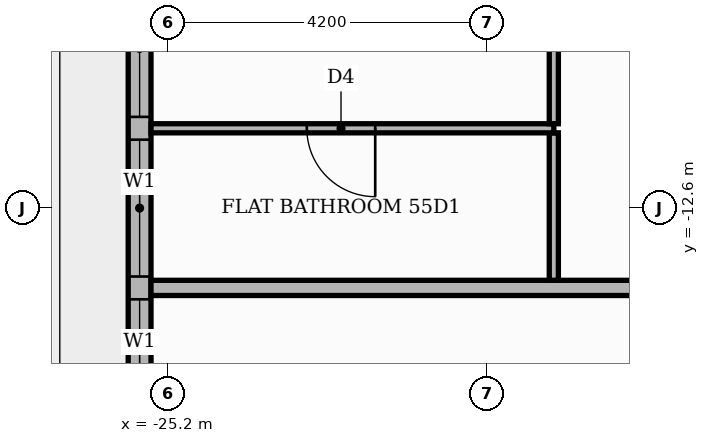
"""IFC4 building model, lengths in metres.
Left out: names, types, materials, properties, quantities, classifications, styles, units other than length and angle.
Written with IfcOpenShell. Run it as: python <this file> out.ifc"""

import sys

from ifc_helpers import new_model, si_unit, direction, frame, frame_2d, origin, place, context, subcontext, project, spatial, rectangle, extrude, element, fill, save


model = new_model("IFC4")
c1 = context("Model", 3, precision=1e-05, world=origin(), true_north=direction((0.0, 1.0)))
c2 = subcontext(c1, "Body", "Model", "MODEL_VIEW")
j1 = project(units=[si_unit("LENGTHUNIT", "METRE"), si_unit("PLANEANGLEUNIT", "RADIAN")], contexts=[c1])
p1 = place(None, origin())
s1 = spatial("IfcSite", under=j1, at=p1, CompositionType="ELEMENT")
p2 = place(p1, origin())
s2 = spatial("IfcBuilding", under=s1, at=p2, CompositionType="ELEMENT")
p3 = place(p2, frame((0.0, 0.0, 231.3)))
s3 = spatial("IfcBuildingStorey", under=s2, at=p3, CompositionType="ELEMENT", Elevation=231.3)
p4 = place(p3, frame((-25.57, -9.0, 0.0), z_axis=(0.0, 0.0, 1.0), x_axis=(0.0, -1.0, 0.0)))
e1 = element("IfcWall", 1, at=p4, inside=s3, PredefinedType="STANDARD", context=c2, shape_type="SweptSolid", body=[
    extrude(rectangle(XDim=7.2, YDim=0.3, at=frame_2d((3.6, 0.0))), origin(), (0.0, 0.0, 1.0), 3.4),
])
p5 = place(p4, frame((0.6, 0.0, 0.9)))
e2 = element("IfcOpeningElement", 2, at=p5, cuts=e1, PredefinedType="OPENING", context=c2, shape_type="SweptSolid", body=[
    extrude(rectangle(XDim=1.8, YDim=2.1, at=frame_2d((0.9, 1.05))), frame((0.0, 0.16, 0.0), z_axis=(0.0, -1.0, 0.0), x_axis=(1.0, 0.0, 0.0)), (0.0, 0.0, 1.0), 0.32),
])
p6 = place(p4, frame((2.7, 0.0, 0.9)))
e3 = element("IfcOpeningElement", 3, at=p6, cuts=e1, PredefinedType="OPENING", context=c2, shape_type="SweptSolid", body=[
    extrude(rectangle(XDim=1.8, YDim=2.1, at=frame_2d((0.9, 1.05))), frame((0.0, 0.16, 0.0), z_axis=(0.0, -1.0, 0.0), x_axis=(1.0, 0.0, 0.0)), (0.0, 0.0, 1.0), 0.32),
])
p7 = place(p4, frame((4.8, 0.0, 0.9)))
e4 = element("IfcOpeningElement", 4, at=p7, cuts=e1, PredefinedType="OPENING", context=c2, shape_type="SweptSolid", body=[
    extrude(rectangle(XDim=1.8, YDim=2.1, at=frame_2d((0.9, 1.05))), frame((0.0, 0.16, 0.0), z_axis=(0.0, -1.0, 0.0), x_axis=(1.0, 0.0, 0.0)), (0.0, 0.0, 1.0), 0.32),
])
p8 = place(p3, frame((-25.42, -13.65, 0.0), z_axis=(0.0, 0.0, 1.0), x_axis=(1.0, 0.0, 0.0)))
e5 = element("IfcWall", 5, at=p8, inside=s3, PredefinedType="PARTITIONING", context=c2, shape_type="SweptSolid", body=[
    extrude(rectangle(XDim=39.07, YDim=0.2, at=frame_2d((19.535, 0.0))), origin(), (0.0, 0.0, 1.0), 3.4),
])
p9 = place(p8, frame((13.32, 0.0, 0.0)))
e6 = element("IfcOpeningElement", 6, at=p9, cuts=e5, PredefinedType="OPENING", context=c2, shape_type="SweptSolid", body=[
    extrude(rectangle(XDim=1.1, YDim=2.4, at=frame_2d((0.55, 1.2))), frame((0.0, 0.11, 0.0), z_axis=(0.0, -1.0, 0.0), x_axis=(1.0, 0.0, 0.0)), (0.0, 0.0, 1.0), 0.22),
])
p10 = place(p8, frame((21.72, 0.0, 0.0)))
e7 = element("IfcOpeningElement", 7, at=p10, cuts=e5, PredefinedType="OPENING", context=c2, shape_type="SweptSolid", body=[
    extrude(rectangle(XDim=1.1, YDim=2.4, at=frame_2d((0.55, 1.2))), frame((0.0, 0.11, 0.0), z_axis=(0.0, -1.0, 0.0), x_axis=(1.0, 0.0, 0.0)), (0.0, 0.0, 1.0), 0.22),
])
p11 = place(p3, frame((-20.12, -13.55, 0.0), z_axis=(0.0, 0.0, 1.0), x_axis=(0.0, 1.0, 0.0)))
e8 = element("IfcWall", 8, at=p11, inside=s3, PredefinedType="PARTITIONING", context=c2, shape_type="SweptSolid", body=[
    extrude(rectangle(XDim=1.94, YDim=0.12, at=frame_2d((0.97, 0.0))), origin(), (0.0, 0.0, 1.0), 3.4),
])
p12 = place(p3, frame((-25.42, -11.55, 0.0), z_axis=(0.0, 0.0, 1.0), x_axis=(1.0, 0.0, 0.0)))
e9 = element("IfcWall", 9, at=p12, inside=s3, PredefinedType="PARTITIONING", context=c2, shape_type="SweptSolid", body=[
    extrude(rectangle(XDim=5.3, YDim=0.12, at=frame_2d((2.65, 0.0))), origin(), (0.0, 0.0, 1.0), 3.4),
])
p13 = place(p12, frame((2.05, 0.0, 0.0)))
e10 = element("IfcOpeningElement", 10, at=p13, cuts=e9, PredefinedType="OPENING", context=c2, shape_type="SweptSolid", body=[
    extrude(rectangle(XDim=0.9, YDim=2.1, at=frame_2d((0.45, 1.05))), frame((0.0, 0.07, 0.0), z_axis=(0.0, -1.0, 0.0), x_axis=(1.0, 0.0, 0.0)), (0.0, 0.0, 1.0), 0.14),
])
p14 = place(p3, frame((-20.12, -11.49, 0.0), z_axis=(0.0, 0.0, 1.0), x_axis=(0.0, 1.0, 0.0)))
e11 = element("IfcWall", 11, at=p14, inside=s3, PredefinedType="PARTITIONING", context=c2, shape_type="SweptSolid", body=[
    extrude(rectangle(XDim=4.08, YDim=0.12, at=frame_2d((2.04, 0.0))), origin(), (0.0, 0.0, 1.0), 3.4),
])
p15 = place(p14, frame((1.59, 0.0, 0.0)))
e12 = element("IfcOpeningElement", 12, at=p15, cuts=e11, PredefinedType="OPENING", context=c2, shape_type="SweptSolid", body=[
    extrude(rectangle(XDim=0.9, YDim=2.1, at=frame_2d((0.45, 1.05))), frame((0.0, 0.07, 0.0), z_axis=(0.0, -1.0, 0.0), x_axis=(1.0, 0.0, 0.0)), (0.0, 0.0, 1.0), 0.14),
])
p16 = place(p5, origin())
e13 = element("IfcWindow", 13, at=p16, inside=s3, PartitioningType="SINGLE_PANEL", PredefinedType="WINDOW", context=c2, shape_type="SweptSolid", body=[
    extrude(rectangle(XDim=1.8, YDim=2.1, at=frame_2d((0.9, 1.05))), frame((0.0, 0.03, 0.0), z_axis=(0.0, -1.0, 0.0), x_axis=(1.0, 0.0, 0.0)), (0.0, 0.0, 1.0), 0.06),
])
fill(e2, e13)
p17 = place(p6, origin())
e14 = element("IfcWindow", 14, at=p17, inside=s3, PartitioningType="SINGLE_PANEL", PredefinedType="WINDOW", context=c2, shape_type="SweptSolid", body=[
    extrude(rectangle(XDim=1.8, YDim=2.1, at=frame_2d((0.9, 1.05))), frame((0.0, 0.03, 0.0), z_axis=(0.0, -1.0, 0.0), x_axis=(1.0, 0.0, 0.0)), (0.0, 0.0, 1.0), 0.06),
])
fill(e3, e14)
p18 = place(p7, origin())
e15 = element("IfcWindow", 15, at=p18, inside=s3, PartitioningType="SINGLE_PANEL", PredefinedType="WINDOW", context=c2, shape_type="SweptSolid", body=[
    extrude(rectangle(XDim=1.8, YDim=2.1, at=frame_2d((0.9, 1.05))), frame((0.0, 0.03, 0.0), z_axis=(0.0, -1.0, 0.0), x_axis=(1.0, 0.0, 0.0)), (0.0, 0.0, 1.0), 0.06),
])
fill(e4, e15)
p19 = place(p13, frame((0.9, 0.0, 0.0), z_axis=(0.0, 0.0, 1.0), x_axis=(-1.0, 0.0, 0.0)))
e16 = element("IfcDoor", 16, at=p19, inside=s3, OperationType="SINGLE_SWING_RIGHT", PredefinedType="DOOR", context=c2, shape_type="SweptSolid", body=[
    extrude(rectangle(XDim=0.9, YDim=2.1, at=frame_2d((0.45, 1.05))), frame((0.0, 0.025, 0.0), z_axis=(0.0, -1.0, 0.0), x_axis=(1.0, 0.0, 0.0)), (0.0, 0.0, 1.0), 0.05),
])
fill(e10, e16)
save(model, sys.argv[1])
